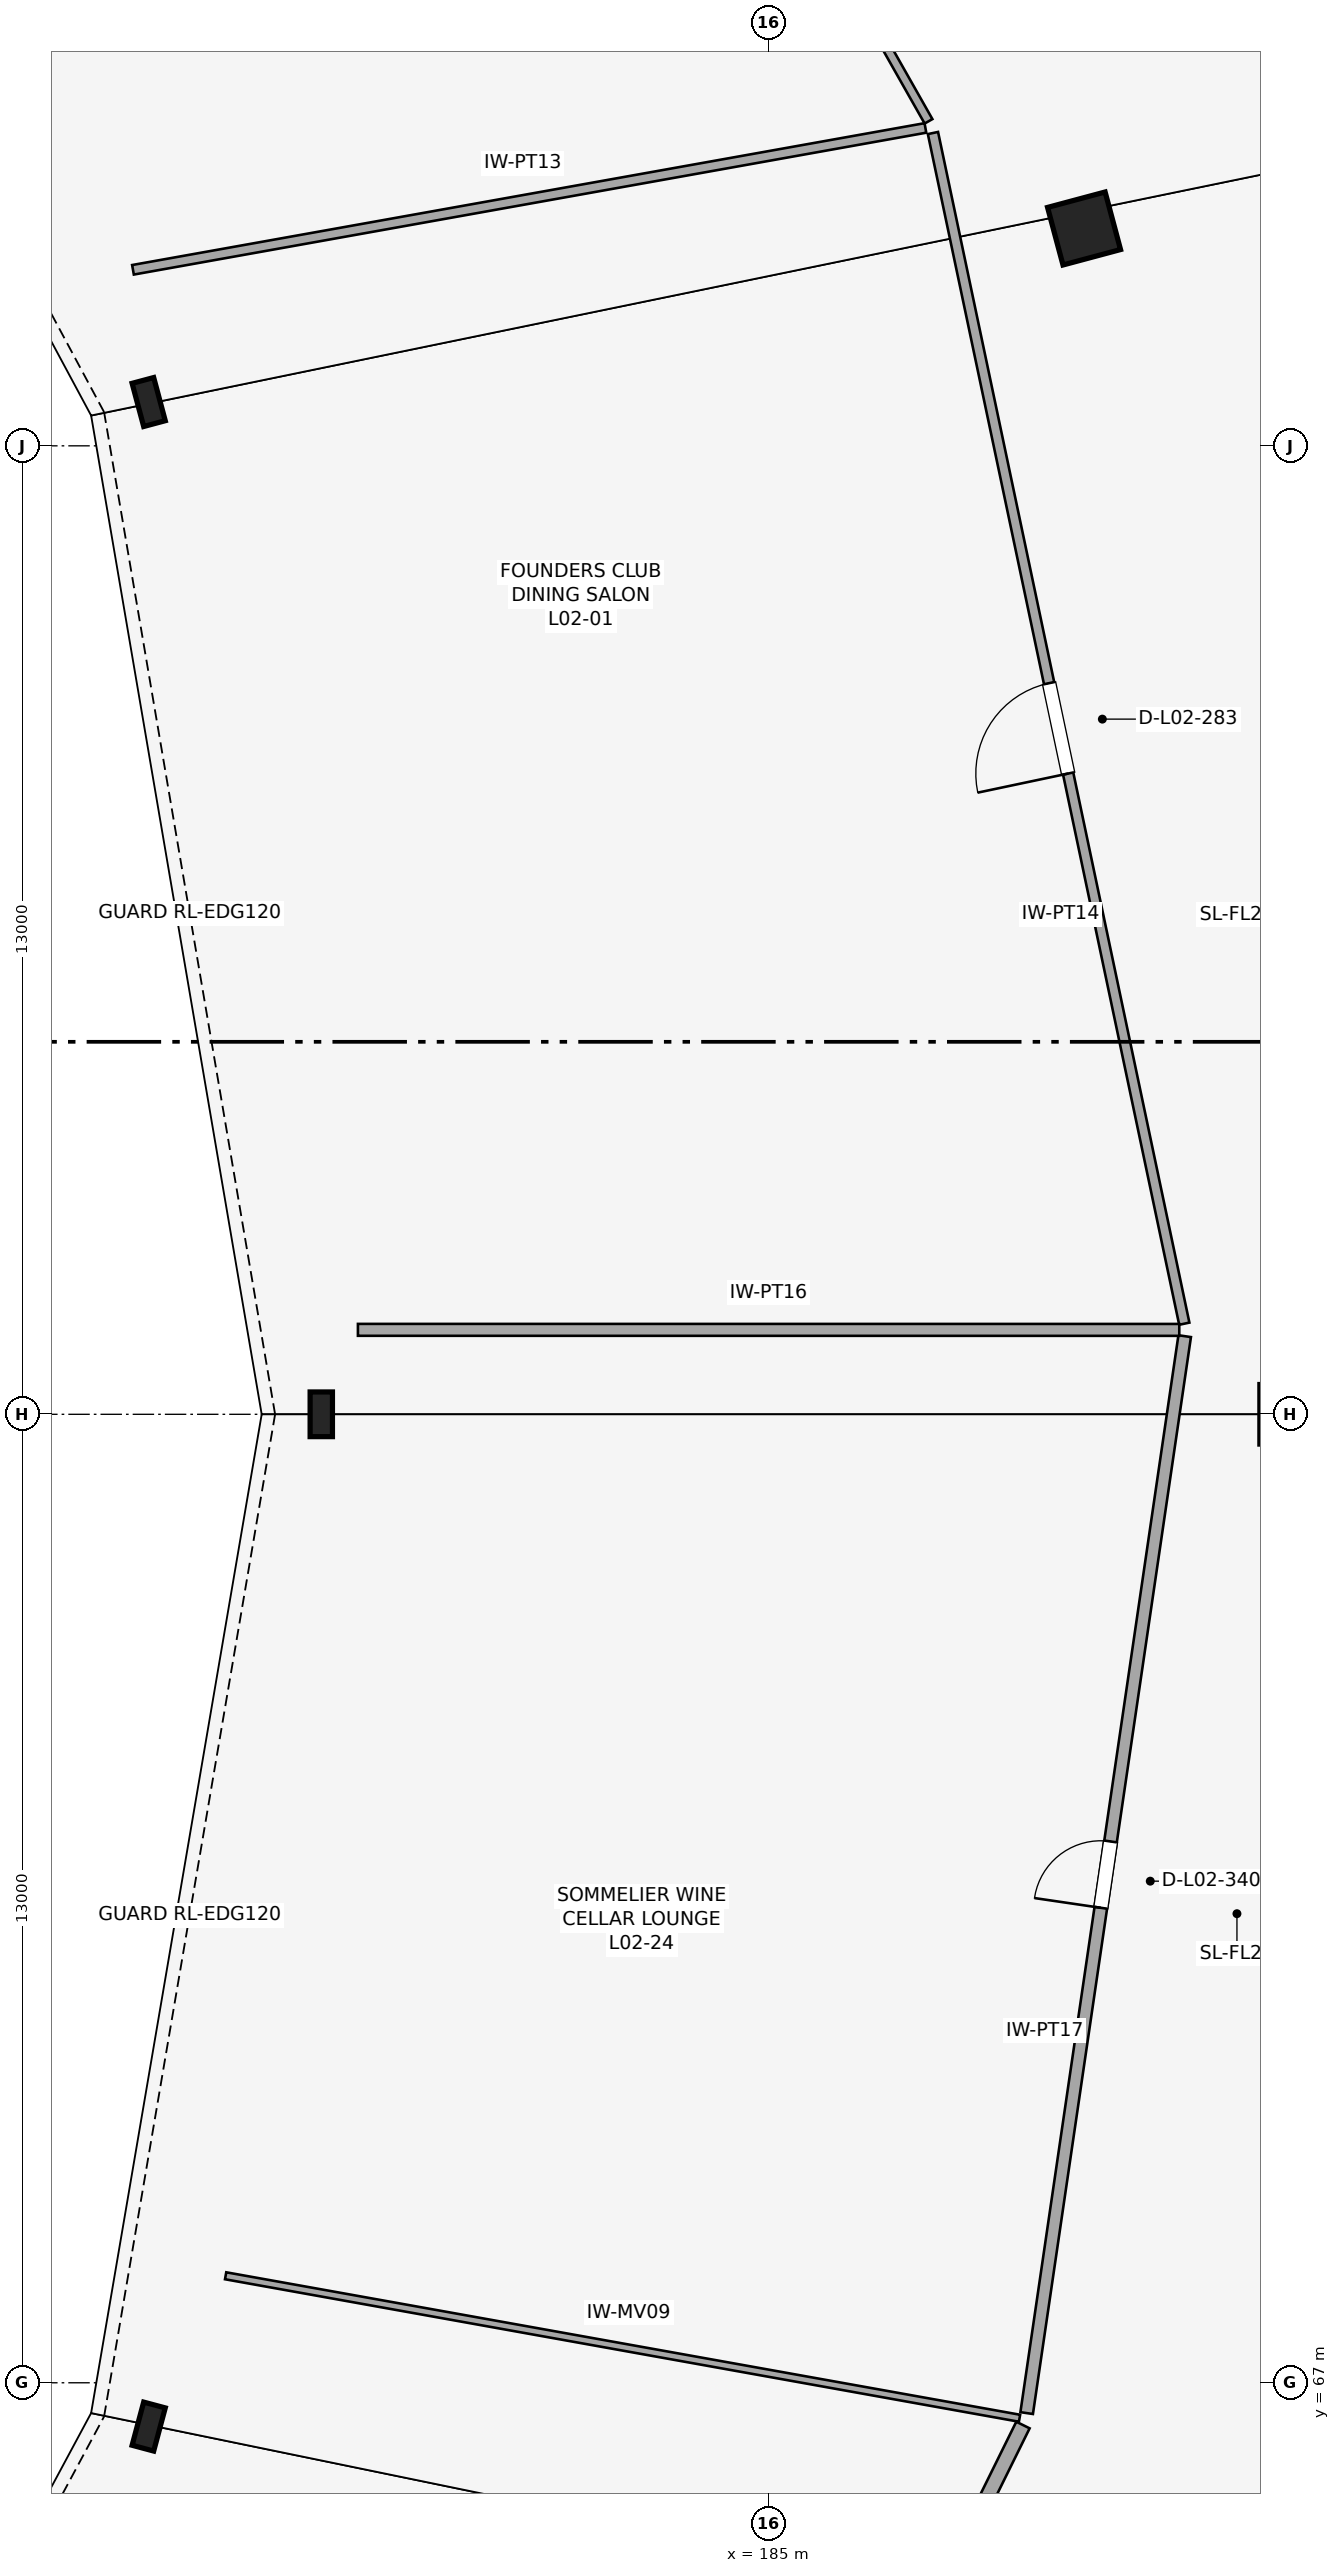
"""IFC4 building model, lengths in metres.
Left out: names, types, materials, properties, quantities, classifications, styles, units other than length and angle.
Written with IfcOpenShell. Run it as: python <this file> out.ifc"""

import sys

from ifc_helpers import new_model, si_unit, direction, frame, frame_2d, origin, origin_2d, place, context, subcontext, project, spatial, rectangle, i_section, extrude, element, fill, save


model = new_model("IFC4")
c1 = context("Model", 3, precision=1e-05, world=origin(), true_north=direction((0.0, 1.0)))
c2 = subcontext(c1, "Body", "Model", "MODEL_VIEW")
j1 = project(units=[si_unit("LENGTHUNIT", "METRE"), si_unit("PLANEANGLEUNIT", "RADIAN")], contexts=[c1])
p1 = place(None, origin())
s1 = spatial("IfcSite", under=j1, at=p1, CompositionType="ELEMENT")
p2 = place(p1, origin())
s2 = spatial("IfcBuilding", under=s1, at=p2, CompositionType="ELEMENT")
p3 = place(p2, frame((0.0, 0.0, 10.6)))
s3 = spatial("IfcBuildingStorey", under=s2, at=p3, CompositionType="ELEMENT", Elevation=10.6)
for number, where, z_axis, x_axis in (
    (1, (179.0, 80.0, 0.0), (0.0, 0.0, 1.0), (1.0, 0.0, 0.0)),
    (2, (176.683, 93.588, 0.0), (0.0, 0.0, 1.0), (0.966, 0.259, 0.0)),
    (3, (176.683, 66.412, 0.0), (0.0, 0.0, 1.0), (0.966, -0.259, 0.0)),
):
    element("IfcColumn", number, at=place(p3, frame(where, z_axis=z_axis, x_axis=x_axis)), inside=s3, PredefinedType="COLUMN", context=c2, shape_type="SweptSolid", body=[
        extrude(i_section(OverallWidth=0.3, OverallDepth=0.6, WebThickness=0.015, FlangeThickness=0.03, FilletRadius=0.027, at=origin_2d()), origin(), (0.0, 0.0, 1.0), 5.0),
    ])
p4 = place(p3, frame((192.0, 80.0, -0.28), z_axis=(0.0, 0.0, 1.0), x_axis=(1.0, 0.0, 0.0)))
e4 = element("IfcColumn", 4, at=p4, inside=s3, PredefinedType="COLUMN", context=c2, shape_type="SweptSolid", body=[
    extrude(rectangle(XDim=0.8, YDim=0.8, at=origin_2d()), origin(), (0.0, 0.0, 1.0), 5.28),
])
p5 = place(p3, frame((189.24, 95.917, 0.0), z_axis=(0.0, 0.0, 1.0), x_axis=(0.965925826289, 0.258819045103, 0.0)))
e5 = element("IfcColumn", 5, at=p5, inside=s3, PredefinedType="COLUMN", context=c2, shape_type="SweptSolid", body=[
    extrude(rectangle(XDim=0.8, YDim=0.8, at=origin_2d()), origin(), (0.0, 0.0, 1.0), 5.0),
])
p6 = place(p3, frame((190.586, 81.216, 0.0), z_axis=(0.0, 0.0, 1.0), x_axis=(-0.206567092779, 0.97843243823, 0.0)))
e6 = element("IfcWall", 6, at=p6, inside=s3, PredefinedType="PARTITIONING", context=c2, shape_type="SweptSolid", body=[
    extrude(rectangle(XDim=16.335, YDim=0.14, at=frame_2d((8.167, 0.0))), origin(), (0.0, 0.0, 1.0), 3.47),
])
p7 = place(p6, frame((7.548, 0.0, 0.0)))
e7 = element("IfcOpeningElement", 7, at=p7, cuts=e6, PredefinedType="OPENING", context=c2, shape_type="SweptSolid", body=[
    extrude(rectangle(XDim=1.24, YDim=2.38, at=frame_2d((0.62, 1.19))), frame((0.0, 0.08, 0.0), z_axis=(0.0, -1.0, 0.0), x_axis=(1.0, 0.0, 0.0)), (0.0, 0.0, 1.0), 0.16),
])
p8 = place(p3, frame((176.472, 95.363, 0.0), z_axis=(0.0, 0.0, 1.0), x_axis=(0.984352788702, 0.176208931032, 0.0)))
e8 = element("IfcWall", 8, at=p8, inside=s3, PredefinedType="PARTITIONING", context=c2, shape_type="SweptSolid", body=[
    extrude(rectangle(XDim=10.807, YDim=0.13, at=frame_2d((5.404, 0.0))), origin(), (0.0, 0.0, 1.0), 3.47),
])
p9 = place(p3, frame((187.152, 97.356, 0.0), z_axis=(0.0, 0.0, 1.0), x_axis=(-0.493145963638, 0.869946583732, 0.0)))
e9 = element("IfcWall", 9, at=p9, inside=s3, PredefinedType="PARTITIONING", context=c2, shape_type="SweptSolid", body=[
    extrude(rectangle(XDim=15.423, YDim=0.12, at=frame_2d((7.712, 0.0))), origin(), (0.0, 0.0, 1.0), 3.47),
])
p10 = place(p9, frame((6.992, 0.0, 0.0)))
e10 = element("IfcOpeningElement", 10, at=p10, cuts=e9, PredefinedType="OPENING", context=c2, shape_type="SweptSolid", body=[
    extrude(rectangle(XDim=1.44, YDim=2.24, at=frame_2d((0.72, 1.12))), frame((0.0, 0.07, 0.0), z_axis=(0.0, -1.0, 0.0), x_axis=(1.0, 0.0, 0.0)), (0.0, 0.0, 1.0), 0.14),
])
p11 = place(p3, frame((180.89, 51.186, 0.0), z_axis=(0.0, 0.0, 1.0), x_axis=(0.442820639323, 0.89661021709, 0.0)))
e11 = element("IfcWall", 11, at=p11, inside=s3, PredefinedType="PARTITIONING", context=c2, shape_type="SweptSolid", body=[
    extrude(rectangle(XDim=17.005, YDim=0.2, at=frame_2d((8.502, 0.0))), origin(), (0.0, 0.0, 1.0), 3.47),
])
p12 = place(p11, frame((7.592, 0.0, 0.0)))
e12 = element("IfcOpeningElement", 12, at=p12, cuts=e11, PredefinedType="OPENING", context=c2, shape_type="SweptSolid", body=[
    extrude(rectangle(XDim=1.82, YDim=2.38, at=frame_2d((0.91, 1.19))), frame((0.0, 0.11, 0.0), z_axis=(0.0, -1.0, 0.0), x_axis=(1.0, 0.0, 0.0)), (0.0, 0.0, 1.0), 0.22),
])
p13 = place(p3, frame((177.716, 68.436, 0.0), z_axis=(0.0, 0.0, 1.0), x_axis=(0.984280353851, -0.176613094143, 0.0)))
e13 = element("IfcWall", 13, at=p13, inside=s3, PredefinedType="MOVABLE", context=c2, shape_type="SweptSolid", body=[
    extrude(rectangle(XDim=10.828, YDim=0.095, at=frame_2d((5.414, 0.0))), origin(), (0.0, 0.0, 1.0), 3.47),
])
p14 = place(p3, frame((188.469, 66.593, 0.0), z_axis=(0.0, 0.0, 1.0), x_axis=(0.145191396353, 0.989403587231, 0.0)))
e14 = element("IfcWall", 14, at=p14, inside=s3, PredefinedType="PARTITIONING", context=c2, shape_type="SweptSolid", body=[
    extrude(rectangle(XDim=14.611, YDim=0.17, at=frame_2d((7.305, 0.0))), origin(), (0.0, 0.0, 1.0), 3.47),
])
p15 = place(p14, frame((6.855, 0.0, 0.0)))
e15 = element("IfcOpeningElement", 15, at=p15, cuts=e14, PredefinedType="OPENING", context=c2, shape_type="SweptSolid", body=[
    extrude(rectangle(XDim=0.9, YDim=2.24, at=frame_2d((0.45, 1.12))), frame((0.0, 0.095, 0.0), z_axis=(0.0, -1.0, 0.0), x_axis=(1.0, 0.0, 0.0)), (0.0, 0.0, 1.0), 0.19),
])
p16 = place(p3, frame((179.492, 81.134, 0.0), z_axis=(0.0, 0.0, 1.0), x_axis=(0.999999997794, -6.6423115e-05, 0.0)))
e16 = element("IfcWall", 16, at=p16, inside=s3, PredefinedType="PARTITIONING", context=c2, shape_type="SweptSolid", body=[
    extrude(rectangle(XDim=11.027, YDim=0.16, at=frame_2d((5.513, 0.0))), origin(), (0.0, 0.0, 1.0), 3.47),
])
p17 = place(p7, origin())
e17 = element("IfcDoor", 17, at=p17, inside=s3, OperationType="SINGLE_SWING_LEFT", PredefinedType="DOOR", context=c2, shape_type="SweptSolid", body=[
    extrude(rectangle(XDim=1.24, YDim=2.38, at=frame_2d((0.62, 1.19))), frame((0.0, 0.025, 0.0), z_axis=(0.0, -1.0, 0.0), x_axis=(1.0, 0.0, 0.0)), (0.0, 0.0, 1.0), 0.05),
])
fill(e7, e17)
p18 = place(p15, origin())
e18 = element("IfcDoor", 18, at=p18, inside=s3, OperationType="SINGLE_SWING_LEFT", PredefinedType="DOOR", context=c2, shape_type="SweptSolid", body=[
    extrude(rectangle(XDim=0.9, YDim=2.24, at=frame_2d((0.45, 1.12))), frame((0.0, 0.025, 0.0), z_axis=(0.0, -1.0, 0.0), x_axis=(1.0, 0.0, 0.0)), (0.0, 0.0, 1.0), 0.05),
])
fill(e15, e18)
save(model, sys.argv[1])
